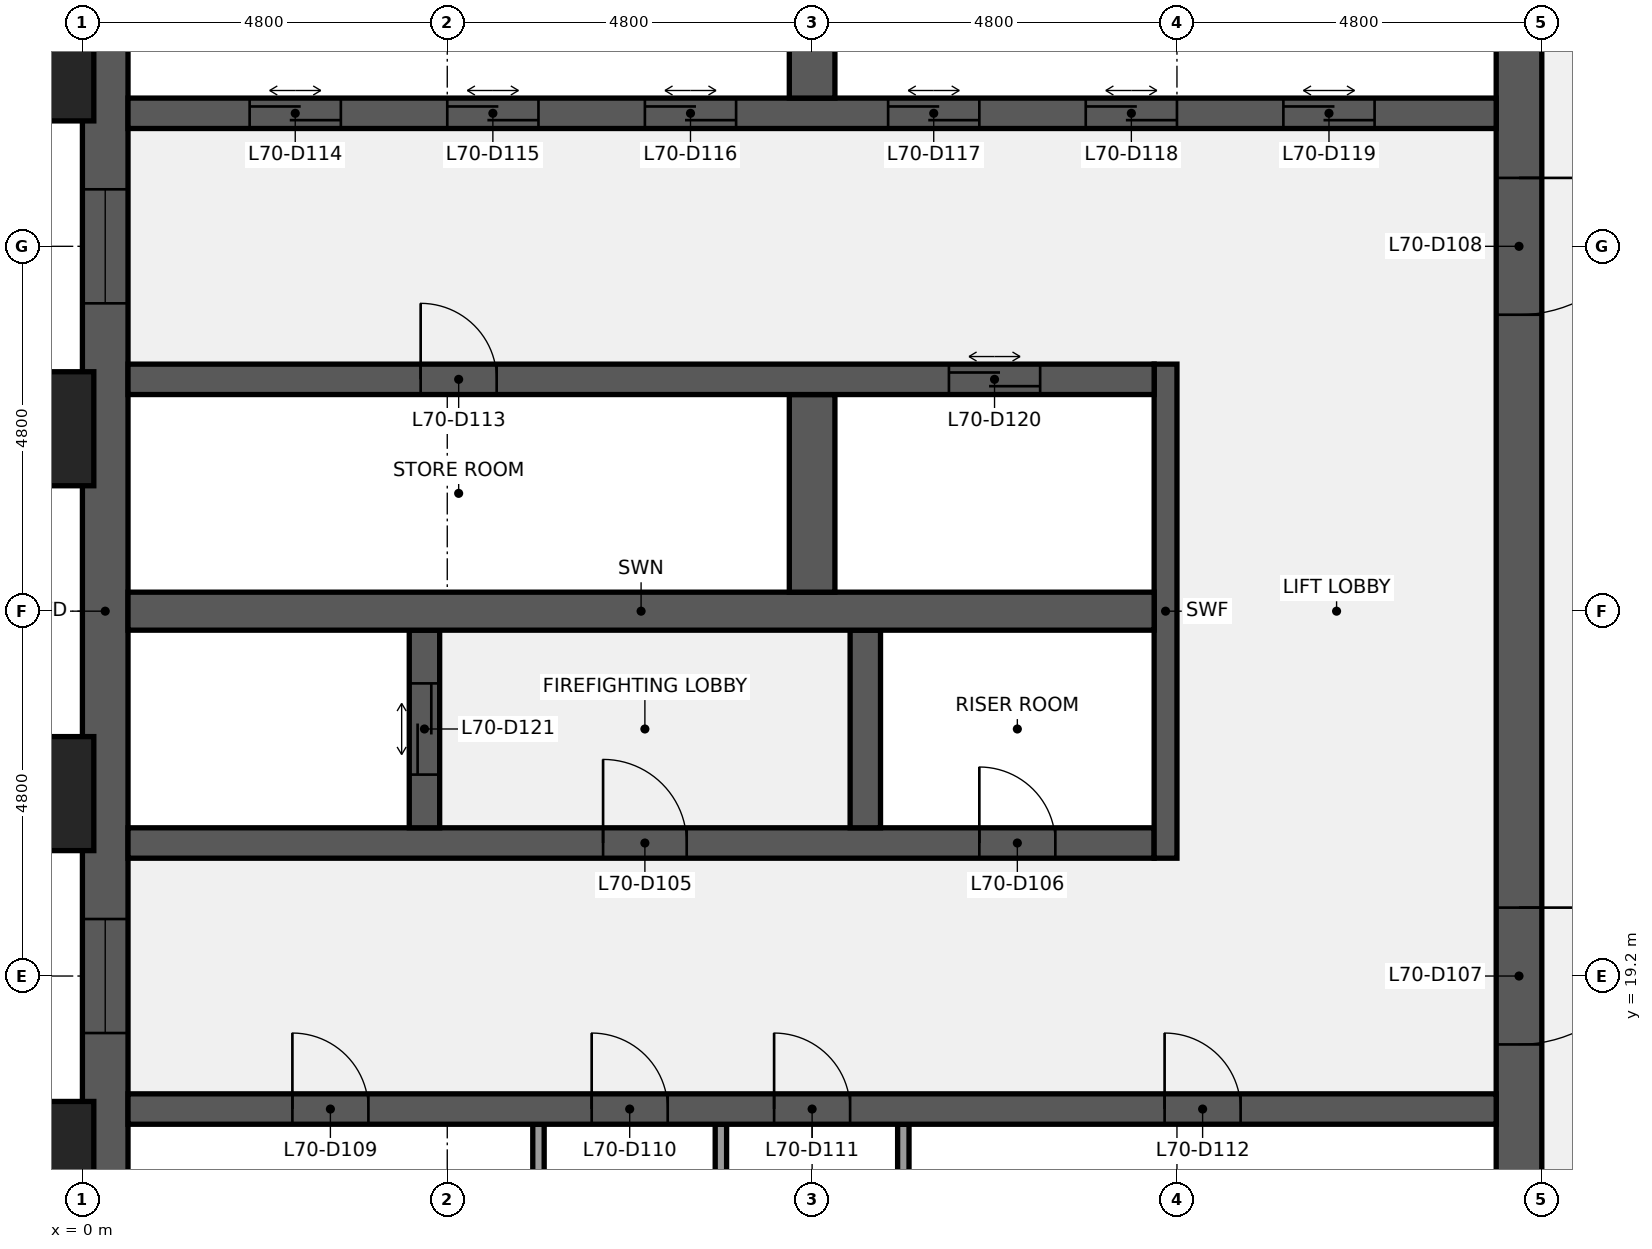
"""IFC4 building model, lengths in metres.
Left out: names, types, materials, properties, quantities, classifications, styles, units other than length and angle.
Written with IfcOpenShell. Run it as: python <this file> out.ifc"""

import sys

from ifc_helpers import new_model, si_unit, direction, frame, frame_2d, origin, origin_2d, place, context, subcontext, project, spatial, rectangle, extrude, element, fill, save


model = new_model("IFC4")
c1 = context("Model", 3, precision=1e-05, world=origin(), true_north=direction((0.0, 1.0)))
c2 = subcontext(c1, "Body", "Model", "MODEL_VIEW")
j1 = project(units=[si_unit("LENGTHUNIT", "METRE"), si_unit("PLANEANGLEUNIT", "RADIAN")], contexts=[c1])
p1 = place(None, origin())
s1 = spatial("IfcSite", under=j1, at=p1, CompositionType="ELEMENT")
p2 = place(p1, origin())
s2 = spatial("IfcBuilding", under=s1, at=p2, CompositionType="ELEMENT")
p3 = place(p2, frame((0.0, 0.0, 318.3)))
s3 = spatial("IfcBuildingStorey", under=s2, at=p3, CompositionType="ELEMENT", Elevation=318.3)
p4 = place(p3, frame((0.3, 9.6, 0.0), z_axis=(0.0, 0.0, 1.0), x_axis=(0.0, 1.0, 0.0)))
e1 = element("IfcWall", 1, at=p4, inside=s3, PredefinedType="SHEAR", context=c2, shape_type="SweptSolid", body=[
    extrude(rectangle(XDim=28.8, YDim=0.6, at=frame_2d((14.4, 0.0))), origin(), (0.0, 0.0, 1.0), 3.84),
])
p5 = place(p4, frame((8.85, 0.0, 0.9)))
e2 = element("IfcOpeningElement", 2, at=p5, cuts=e1, PredefinedType="OPENING", context=c2, shape_type="SweptSolid", body=[
    extrude(rectangle(XDim=1.5, YDim=1.5, at=frame_2d((0.75, 0.75))), frame((0.0, 0.31, 0.0), z_axis=(0.0, -1.0, 0.0), x_axis=(1.0, 0.0, 0.0)), (0.0, 0.0, 1.0), 0.62),
])
p6 = place(p4, frame((18.45, 0.0, 0.9)))
e3 = element("IfcOpeningElement", 3, at=p6, cuts=e1, PredefinedType="OPENING", context=c2, shape_type="SweptSolid", body=[
    extrude(rectangle(XDim=1.5, YDim=1.5, at=frame_2d((0.75, 0.75))), frame((0.0, 0.31, 0.0), z_axis=(0.0, -1.0, 0.0), x_axis=(1.0, 0.0, 0.0)), (0.0, 0.0, 1.0), 0.62),
])
p7 = place(p3, frame((18.9, 38.4, 0.0), z_axis=(0.0, 0.0, 1.0), x_axis=(0.0, -1.0, 0.0)))
e4 = element("IfcWall", 4, at=p7, inside=s3, PredefinedType="SHEAR", context=c2, shape_type="SweptSolid", body=[
    extrude(rectangle(XDim=28.8, YDim=0.6, at=frame_2d((14.4, 0.0))), origin(), (0.0, 0.0, 1.0), 3.84),
])
p8 = place(p7, frame((18.3, 0.0, 0.0)))
e5 = element("IfcOpeningElement", 5, at=p8, cuts=e4, PredefinedType="OPENING", context=c2, shape_type="SweptSolid", body=[
    extrude(rectangle(XDim=1.8, YDim=2.1, at=frame_2d((0.9, 1.05))), frame((0.0, 0.31, 0.0), z_axis=(0.0, -1.0, 0.0), x_axis=(1.0, 0.0, 0.0)), (0.0, 0.0, 1.0), 0.62),
])
p9 = place(p7, frame((8.7, 0.0, 0.0)))
e6 = element("IfcOpeningElement", 6, at=p9, cuts=e4, PredefinedType="OPENING", context=c2, shape_type="SweptSolid", body=[
    extrude(rectangle(XDim=1.8, YDim=2.1, at=frame_2d((0.9, 1.05))), frame((0.0, 0.31, 0.0), z_axis=(0.0, -1.0, 0.0), x_axis=(1.0, 0.0, 0.0)), (0.0, 0.0, 1.0), 0.62),
])
for number, where, z_axis, x_axis in (
    (7, (6.0, 14.65, 0.0), (0.0, 0.0, 1.0), (0.0, 1.0, 0.0)),
    (8, (8.4, 14.65, 0.0), (0.0, 0.0, 1.0), (0.0, 1.0, 0.0)),
    (9, (10.8, 14.65, 0.0), (0.0, 0.0, 1.0), (0.0, 1.0, 0.0)),
):
    element("IfcWall", number, at=place(p3, frame(where, z_axis=z_axis, x_axis=x_axis)), inside=s3, PredefinedType="PARTITIONING", context=c2, shape_type="SweptSolid", body=[
        extrude(rectangle(XDim=2.6, YDim=0.15, at=frame_2d((1.3, 0.0))), origin(), (0.0, 0.0, 1.0), 3.84),
    ])
p10 = place(p3, frame((0.6, 17.45, 0.0), z_axis=(0.0, 0.0, 1.0), x_axis=(1.0, 0.0, 0.0)))
e10 = element("IfcWall", 10, at=p10, inside=s3, PredefinedType="SHEAR", context=c2, shape_type="SweptSolid", body=[
    extrude(rectangle(XDim=18.0, YDim=0.4, at=frame_2d((9.0, 0.0))), origin(), (0.0, 0.0, 1.0), 3.84),
])
p11 = place(p10, frame((2.163, 0.0, 0.0)))
e11 = element("IfcOpeningElement", 11, at=p11, cuts=e10, PredefinedType="OPENING", context=c2, shape_type="SweptSolid", body=[
    extrude(rectangle(XDim=1.0, YDim=2.1, at=frame_2d((0.5, 1.05))), frame((0.0, 0.21, 0.0), z_axis=(0.0, -1.0, 0.0), x_axis=(1.0, 0.0, 0.0)), (0.0, 0.0, 1.0), 0.42),
])
p12 = place(p10, frame((6.1, 0.0, 0.0)))
e12 = element("IfcOpeningElement", 12, at=p12, cuts=e10, PredefinedType="OPENING", context=c2, shape_type="SweptSolid", body=[
    extrude(rectangle(XDim=1.0, YDim=2.1, at=frame_2d((0.5, 1.05))), frame((0.0, 0.21, 0.0), z_axis=(0.0, -1.0, 0.0), x_axis=(1.0, 0.0, 0.0)), (0.0, 0.0, 1.0), 0.42),
])
p13 = place(p10, frame((8.5, 0.0, 0.0)))
e13 = element("IfcOpeningElement", 13, at=p13, cuts=e10, PredefinedType="OPENING", context=c2, shape_type="SweptSolid", body=[
    extrude(rectangle(XDim=1.0, YDim=2.1, at=frame_2d((0.5, 1.05))), frame((0.0, 0.21, 0.0), z_axis=(0.0, -1.0, 0.0), x_axis=(1.0, 0.0, 0.0)), (0.0, 0.0, 1.0), 0.42),
])
p14 = place(p10, frame((13.637, 0.0, 0.0)))
e14 = element("IfcOpeningElement", 14, at=p14, cuts=e10, PredefinedType="OPENING", context=c2, shape_type="SweptSolid", body=[
    extrude(rectangle(XDim=1.0, YDim=2.1, at=frame_2d((0.5, 1.05))), frame((0.0, 0.21, 0.0), z_axis=(0.0, -1.0, 0.0), x_axis=(1.0, 0.0, 0.0)), (0.0, 0.0, 1.0), 0.42),
])
p15 = place(p3, frame((0.6, 20.95, 0.0), z_axis=(0.0, 0.0, 1.0), x_axis=(1.0, 0.0, 0.0)))
e15 = element("IfcWall", 15, at=p15, inside=s3, PredefinedType="SHEAR", context=c2, shape_type="SweptSolid", body=[
    extrude(rectangle(XDim=13.5, YDim=0.4, at=frame_2d((6.75, 0.0))), origin(), (0.0, 0.0, 1.0), 3.84),
])
p16 = place(p15, frame((6.25, 0.0, 0.0)))
e16 = element("IfcOpeningElement", 16, at=p16, cuts=e15, PredefinedType="OPENING", context=c2, shape_type="SweptSolid", body=[
    extrude(rectangle(XDim=1.1, YDim=2.1, at=frame_2d((0.55, 1.05))), frame((0.0, 0.21, 0.0), z_axis=(0.0, -1.0, 0.0), x_axis=(1.0, 0.0, 0.0)), (0.0, 0.0, 1.0), 0.42),
])
p17 = place(p15, frame((11.2, 0.0, 0.0)))
e17 = element("IfcOpeningElement", 17, at=p17, cuts=e15, PredefinedType="OPENING", context=c2, shape_type="SweptSolid", body=[
    extrude(rectangle(XDim=1.0, YDim=2.1, at=frame_2d((0.5, 1.05))), frame((0.0, 0.21, 0.0), z_axis=(0.0, -1.0, 0.0), x_axis=(1.0, 0.0, 0.0)), (0.0, 0.0, 1.0), 0.42),
])
p18 = place(p3, frame((14.25, 20.75, 0.0), z_axis=(0.0, 0.0, 1.0), x_axis=(0.0, 1.0, 0.0)))
e18 = element("IfcWall", 18, at=p18, inside=s3, PredefinedType="SHEAR", context=c2, shape_type="SweptSolid", body=[
    extrude(rectangle(XDim=6.5, YDim=0.3, at=frame_2d((3.25, 0.0))), origin(), (0.0, 0.0, 1.0), 3.84),
])
p19 = place(p3, frame((4.5, 21.15, 0.0), z_axis=(0.0, 0.0, 1.0), x_axis=(0.0, 1.0, 0.0)))
e19 = element("IfcWall", 19, at=p19, inside=s3, PredefinedType="SHEAR", context=c2, shape_type="SweptSolid", body=[
    extrude(rectangle(XDim=2.6, YDim=0.4, at=frame_2d((1.3, 0.0))), origin(), (0.0, 0.0, 1.0), 3.84),
])
p20 = place(p19, frame((0.7, 0.0, 0.0)))
e20 = element("IfcOpeningElement", 20, at=p20, cuts=e19, PredefinedType="OPENING", context=c2, shape_type="SweptSolid", body=[
    extrude(rectangle(XDim=1.2, YDim=2.1, at=frame_2d((0.6, 1.05))), frame((0.0, 0.21, 0.0), z_axis=(0.0, -1.0, 0.0), x_axis=(1.0, 0.0, 0.0)), (0.0, 0.0, 1.0), 0.42),
])
p21 = place(p3, frame((10.3, 21.15, 0.0), z_axis=(0.0, 0.0, 1.0), x_axis=(0.0, 1.0, 0.0)))
e21 = element("IfcWall", 21, at=p21, inside=s3, PredefinedType="SHEAR", context=c2, shape_type="SweptSolid", body=[
    extrude(rectangle(XDim=2.6, YDim=0.4, at=frame_2d((1.3, 0.0))), origin(), (0.0, 0.0, 1.0), 3.84),
])
p22 = place(p3, frame((0.6, 24.0, 0.0), z_axis=(0.0, 0.0, 1.0), x_axis=(1.0, 0.0, 0.0)))
e22 = element("IfcWall", 22, at=p22, inside=s3, PredefinedType="SHEAR", context=c2, shape_type="SweptSolid", body=[
    extrude(rectangle(XDim=13.5, YDim=0.5, at=frame_2d((6.75, 0.0))), origin(), (0.0, 0.0, 1.0), 3.84),
])
p23 = place(p3, frame((9.6, 24.25, 0.0), z_axis=(0.0, 0.0, 1.0), x_axis=(0.0, 1.0, 0.0)))
e23 = element("IfcWall", 23, at=p23, inside=s3, PredefinedType="SHEAR", context=c2, shape_type="SweptSolid", body=[
    extrude(rectangle(XDim=2.6, YDim=0.6, at=frame_2d((1.3, 0.0))), origin(), (0.0, 0.0, 1.0), 3.84),
])
p24 = place(p3, frame((0.6, 27.05, 0.0), z_axis=(0.0, 0.0, 1.0), x_axis=(1.0, 0.0, 0.0)))
e24 = element("IfcWall", 24, at=p24, inside=s3, PredefinedType="SHEAR", context=c2, shape_type="SweptSolid", body=[
    extrude(rectangle(XDim=13.5, YDim=0.4, at=frame_2d((6.75, 0.0))), origin(), (0.0, 0.0, 1.0), 3.84),
])
p25 = place(p24, frame((3.85, 0.0, 0.0)))
e25 = element("IfcOpeningElement", 25, at=p25, cuts=e24, PredefinedType="OPENING", context=c2, shape_type="SweptSolid", body=[
    extrude(rectangle(XDim=1.0, YDim=2.1, at=frame_2d((0.5, 1.05))), frame((0.0, 0.21, 0.0), z_axis=(0.0, -1.0, 0.0), x_axis=(1.0, 0.0, 0.0)), (0.0, 0.0, 1.0), 0.42),
])
p26 = place(p24, frame((10.8, 0.0, 0.0)))
e26 = element("IfcOpeningElement", 26, at=p26, cuts=e24, PredefinedType="OPENING", context=c2, shape_type="SweptSolid", body=[
    extrude(rectangle(XDim=1.2, YDim=2.1, at=frame_2d((0.6, 1.05))), frame((0.0, 0.21, 0.0), z_axis=(0.0, -1.0, 0.0), x_axis=(1.0, 0.0, 0.0)), (0.0, 0.0, 1.0), 0.42),
])
p27 = place(p3, frame((0.6, 30.55, 0.0), z_axis=(0.0, 0.0, 1.0), x_axis=(1.0, 0.0, 0.0)))
e27 = element("IfcWall", 27, at=p27, inside=s3, PredefinedType="SHEAR", context=c2, shape_type="SweptSolid", body=[
    extrude(rectangle(XDim=18.0, YDim=0.4, at=frame_2d((9.0, 0.0))), origin(), (0.0, 0.0, 1.0), 3.84),
])
p28 = place(p27, frame((1.6, 0.0, 0.0)))
e28 = element("IfcOpeningElement", 28, at=p28, cuts=e27, PredefinedType="OPENING", context=c2, shape_type="SweptSolid", body=[
    extrude(rectangle(XDim=1.2, YDim=2.1, at=frame_2d((0.6, 1.05))), frame((0.0, 0.21, 0.0), z_axis=(0.0, -1.0, 0.0), x_axis=(1.0, 0.0, 0.0)), (0.0, 0.0, 1.0), 0.42),
])
p29 = place(p27, frame((4.2, 0.0, 0.0)))
e29 = element("IfcOpeningElement", 29, at=p29, cuts=e27, PredefinedType="OPENING", context=c2, shape_type="SweptSolid", body=[
    extrude(rectangle(XDim=1.2, YDim=2.1, at=frame_2d((0.6, 1.05))), frame((0.0, 0.21, 0.0), z_axis=(0.0, -1.0, 0.0), x_axis=(1.0, 0.0, 0.0)), (0.0, 0.0, 1.0), 0.42),
])
p30 = place(p27, frame((6.8, 0.0, 0.0)))
e30 = element("IfcOpeningElement", 30, at=p30, cuts=e27, PredefinedType="OPENING", context=c2, shape_type="SweptSolid", body=[
    extrude(rectangle(XDim=1.2, YDim=2.1, at=frame_2d((0.6, 1.05))), frame((0.0, 0.21, 0.0), z_axis=(0.0, -1.0, 0.0), x_axis=(1.0, 0.0, 0.0)), (0.0, 0.0, 1.0), 0.42),
])
p31 = place(p27, frame((10.0, 0.0, 0.0)))
e31 = element("IfcOpeningElement", 31, at=p31, cuts=e27, PredefinedType="OPENING", context=c2, shape_type="SweptSolid", body=[
    extrude(rectangle(XDim=1.2, YDim=2.1, at=frame_2d((0.6, 1.05))), frame((0.0, 0.21, 0.0), z_axis=(0.0, -1.0, 0.0), x_axis=(1.0, 0.0, 0.0)), (0.0, 0.0, 1.0), 0.42),
])
p32 = place(p27, frame((12.6, 0.0, 0.0)))
e32 = element("IfcOpeningElement", 32, at=p32, cuts=e27, PredefinedType="OPENING", context=c2, shape_type="SweptSolid", body=[
    extrude(rectangle(XDim=1.2, YDim=2.1, at=frame_2d((0.6, 1.05))), frame((0.0, 0.21, 0.0), z_axis=(0.0, -1.0, 0.0), x_axis=(1.0, 0.0, 0.0)), (0.0, 0.0, 1.0), 0.42),
])
p33 = place(p27, frame((15.2, 0.0, 0.0)))
e33 = element("IfcOpeningElement", 33, at=p33, cuts=e27, PredefinedType="OPENING", context=c2, shape_type="SweptSolid", body=[
    extrude(rectangle(XDim=1.2, YDim=2.1, at=frame_2d((0.6, 1.05))), frame((0.0, 0.21, 0.0), z_axis=(0.0, -1.0, 0.0), x_axis=(1.0, 0.0, 0.0)), (0.0, 0.0, 1.0), 0.42),
])
p34 = place(p3, frame((9.6, 30.75, 0.0), z_axis=(0.0, 0.0, 1.0), x_axis=(0.0, 1.0, 0.0)))
e34 = element("IfcWall", 34, at=p34, inside=s3, PredefinedType="SHEAR", context=c2, shape_type="SweptSolid", body=[
    extrude(rectangle(XDim=2.6, YDim=0.6, at=frame_2d((1.3, 0.0))), origin(), (0.0, 0.0, 1.0), 3.84),
])
for number, where, z_axis, x_axis in (
    (35, (-0.75, 16.8, 0.0), (0.0, 0.0, 1.0), (0.0, 1.0, 0.0)),
    (36, (-0.75, 21.6, 0.0), (0.0, 0.0, 1.0), (0.0, 1.0, 0.0)),
    (37, (-0.75, 26.4, 0.0), (0.0, 0.0, 1.0), (0.0, 1.0, 0.0)),
    (38, (-0.75, 31.2, 0.0), (0.0, 0.0, 1.0), (0.0, 1.0, 0.0)),
):
    element("IfcColumn", number, at=place(p3, frame(where, z_axis=z_axis, x_axis=x_axis)), inside=s3, PredefinedType="PILASTER", context=c2, shape_type="SweptSolid", body=[
        extrude(rectangle(XDim=1.8, YDim=1.5, at=origin_2d()), origin(), (0.0, 0.0, 1.0), 4.0),
    ])
p35 = place(p16, origin())
e39 = element("IfcDoor", 39, at=p35, inside=s3, OperationType="SINGLE_SWING_LEFT", PredefinedType="DOOR", context=c2, shape_type="SweptSolid", body=[
    extrude(rectangle(XDim=1.1, YDim=2.1, at=frame_2d((0.55, 1.05))), frame((0.0, 0.025, 0.0), z_axis=(0.0, -1.0, 0.0), x_axis=(1.0, 0.0, 0.0)), (0.0, 0.0, 1.0), 0.05),
])
fill(e16, e39)
p36 = place(p17, origin())
e40 = element("IfcDoor", 40, at=p36, inside=s3, OperationType="SINGLE_SWING_LEFT", PredefinedType="DOOR", context=c2, shape_type="SweptSolid", body=[
    extrude(rectangle(XDim=1.0, YDim=2.1, at=frame_2d((0.5, 1.05))), frame((0.0, 0.025, 0.0), z_axis=(0.0, -1.0, 0.0), x_axis=(1.0, 0.0, 0.0)), (0.0, 0.0, 1.0), 0.05),
])
fill(e17, e40)
p37 = place(p8, origin())
e41 = element("IfcDoor", 41, at=p37, inside=s3, OperationType="DOUBLE_DOOR_SINGLE_SWING", PredefinedType="DOOR", context=c2, shape_type="SweptSolid", body=[
    extrude(rectangle(XDim=1.8, YDim=2.1, at=frame_2d((0.9, 1.05))), frame((0.0, 0.025, 0.0), z_axis=(0.0, -1.0, 0.0), x_axis=(1.0, 0.0, 0.0)), (0.0, 0.0, 1.0), 0.05),
])
fill(e5, e41)
p38 = place(p9, origin())
e42 = element("IfcDoor", 42, at=p38, inside=s3, OperationType="DOUBLE_DOOR_SINGLE_SWING", PredefinedType="DOOR", context=c2, shape_type="SweptSolid", body=[
    extrude(rectangle(XDim=1.8, YDim=2.1, at=frame_2d((0.9, 1.05))), frame((0.0, 0.025, 0.0), z_axis=(0.0, -1.0, 0.0), x_axis=(1.0, 0.0, 0.0)), (0.0, 0.0, 1.0), 0.05),
])
fill(e6, e42)
p39 = place(p11, origin())
e43 = element("IfcDoor", 43, at=p39, inside=s3, OperationType="SINGLE_SWING_LEFT", PredefinedType="DOOR", context=c2, shape_type="SweptSolid", body=[
    extrude(rectangle(XDim=1.0, YDim=2.1, at=frame_2d((0.5, 1.05))), frame((0.0, 0.025, 0.0), z_axis=(0.0, -1.0, 0.0), x_axis=(1.0, 0.0, 0.0)), (0.0, 0.0, 1.0), 0.05),
])
fill(e11, e43)
p40 = place(p12, origin())
e44 = element("IfcDoor", 44, at=p40, inside=s3, OperationType="SINGLE_SWING_LEFT", PredefinedType="DOOR", context=c2, shape_type="SweptSolid", body=[
    extrude(rectangle(XDim=1.0, YDim=2.1, at=frame_2d((0.5, 1.05))), frame((0.0, 0.025, 0.0), z_axis=(0.0, -1.0, 0.0), x_axis=(1.0, 0.0, 0.0)), (0.0, 0.0, 1.0), 0.05),
])
fill(e12, e44)
p41 = place(p13, origin())
e45 = element("IfcDoor", 45, at=p41, inside=s3, OperationType="SINGLE_SWING_LEFT", PredefinedType="DOOR", context=c2, shape_type="SweptSolid", body=[
    extrude(rectangle(XDim=1.0, YDim=2.1, at=frame_2d((0.5, 1.05))), frame((0.0, 0.025, 0.0), z_axis=(0.0, -1.0, 0.0), x_axis=(1.0, 0.0, 0.0)), (0.0, 0.0, 1.0), 0.05),
])
fill(e13, e45)
p42 = place(p14, origin())
e46 = element("IfcDoor", 46, at=p42, inside=s3, OperationType="SINGLE_SWING_LEFT", PredefinedType="DOOR", context=c2, shape_type="SweptSolid", body=[
    extrude(rectangle(XDim=1.0, YDim=2.1, at=frame_2d((0.5, 1.05))), frame((0.0, 0.025, 0.0), z_axis=(0.0, -1.0, 0.0), x_axis=(1.0, 0.0, 0.0)), (0.0, 0.0, 1.0), 0.05),
])
fill(e14, e46)
p43 = place(p25, origin())
e47 = element("IfcDoor", 47, at=p43, inside=s3, OperationType="SINGLE_SWING_LEFT", PredefinedType="DOOR", context=c2, shape_type="SweptSolid", body=[
    extrude(rectangle(XDim=1.0, YDim=2.1, at=frame_2d((0.5, 1.05))), frame((0.0, 0.025, 0.0), z_axis=(0.0, -1.0, 0.0), x_axis=(1.0, 0.0, 0.0)), (0.0, 0.0, 1.0), 0.05),
])
fill(e25, e47)
p44 = place(p28, origin())
e48 = element("IfcDoor", 48, at=p44, inside=s3, OperationType="DOUBLE_DOOR_SLIDING", PredefinedType="DOOR", context=c2, shape_type="SweptSolid", body=[
    extrude(rectangle(XDim=1.2, YDim=2.1, at=frame_2d((0.6, 1.05))), frame((0.0, 0.025, 0.0), z_axis=(0.0, -1.0, 0.0), x_axis=(1.0, 0.0, 0.0)), (0.0, 0.0, 1.0), 0.05),
])
fill(e28, e48)
p45 = place(p29, origin())
e49 = element("IfcDoor", 49, at=p45, inside=s3, OperationType="DOUBLE_DOOR_SLIDING", PredefinedType="DOOR", context=c2, shape_type="SweptSolid", body=[
    extrude(rectangle(XDim=1.2, YDim=2.1, at=frame_2d((0.6, 1.05))), frame((0.0, 0.025, 0.0), z_axis=(0.0, -1.0, 0.0), x_axis=(1.0, 0.0, 0.0)), (0.0, 0.0, 1.0), 0.05),
])
fill(e29, e49)
p46 = place(p30, origin())
e50 = element("IfcDoor", 50, at=p46, inside=s3, OperationType="DOUBLE_DOOR_SLIDING", PredefinedType="DOOR", context=c2, shape_type="SweptSolid", body=[
    extrude(rectangle(XDim=1.2, YDim=2.1, at=frame_2d((0.6, 1.05))), frame((0.0, 0.025, 0.0), z_axis=(0.0, -1.0, 0.0), x_axis=(1.0, 0.0, 0.0)), (0.0, 0.0, 1.0), 0.05),
])
fill(e30, e50)
p47 = place(p31, origin())
e51 = element("IfcDoor", 51, at=p47, inside=s3, OperationType="DOUBLE_DOOR_SLIDING", PredefinedType="DOOR", context=c2, shape_type="SweptSolid", body=[
    extrude(rectangle(XDim=1.2, YDim=2.1, at=frame_2d((0.6, 1.05))), frame((0.0, 0.025, 0.0), z_axis=(0.0, -1.0, 0.0), x_axis=(1.0, 0.0, 0.0)), (0.0, 0.0, 1.0), 0.05),
])
fill(e31, e51)
p48 = place(p32, origin())
e52 = element("IfcDoor", 52, at=p48, inside=s3, OperationType="DOUBLE_DOOR_SLIDING", PredefinedType="DOOR", context=c2, shape_type="SweptSolid", body=[
    extrude(rectangle(XDim=1.2, YDim=2.1, at=frame_2d((0.6, 1.05))), frame((0.0, 0.025, 0.0), z_axis=(0.0, -1.0, 0.0), x_axis=(1.0, 0.0, 0.0)), (0.0, 0.0, 1.0), 0.05),
])
fill(e32, e52)
p49 = place(p33, origin())
e53 = element("IfcDoor", 53, at=p49, inside=s3, OperationType="DOUBLE_DOOR_SLIDING", PredefinedType="DOOR", context=c2, shape_type="SweptSolid", body=[
    extrude(rectangle(XDim=1.2, YDim=2.1, at=frame_2d((0.6, 1.05))), frame((0.0, 0.025, 0.0), z_axis=(0.0, -1.0, 0.0), x_axis=(1.0, 0.0, 0.0)), (0.0, 0.0, 1.0), 0.05),
])
fill(e33, e53)
p50 = place(p26, origin())
e54 = element("IfcDoor", 54, at=p50, inside=s3, OperationType="DOUBLE_DOOR_SLIDING", PredefinedType="DOOR", context=c2, shape_type="SweptSolid", body=[
    extrude(rectangle(XDim=1.2, YDim=2.1, at=frame_2d((0.6, 1.05))), frame((0.0, 0.025, 0.0), z_axis=(0.0, -1.0, 0.0), x_axis=(1.0, 0.0, 0.0)), (0.0, 0.0, 1.0), 0.05),
])
fill(e26, e54)
p51 = place(p20, origin())
e55 = element("IfcDoor", 55, at=p51, inside=s3, OperationType="DOUBLE_DOOR_SLIDING", PredefinedType="DOOR", context=c2, shape_type="SweptSolid", body=[
    extrude(rectangle(XDim=1.2, YDim=2.1, at=frame_2d((0.6, 1.05))), frame((0.0, 0.025, 0.0), z_axis=(0.0, -1.0, 0.0), x_axis=(1.0, 0.0, 0.0)), (0.0, 0.0, 1.0), 0.05),
])
fill(e20, e55)
p52 = place(p5, origin())
e56 = element("IfcWindow", 56, at=p52, inside=s3, PartitioningType="SINGLE_PANEL", PredefinedType="WINDOW", context=c2, shape_type="SweptSolid", body=[
    extrude(rectangle(XDim=1.5, YDim=1.5, at=frame_2d((0.75, 0.75))), frame((0.0, 0.03, 0.0), z_axis=(0.0, -1.0, 0.0), x_axis=(1.0, 0.0, 0.0)), (0.0, 0.0, 1.0), 0.06),
])
fill(e2, e56)
p53 = place(p6, origin())
e57 = element("IfcWindow", 57, at=p53, inside=s3, PartitioningType="SINGLE_PANEL", PredefinedType="WINDOW", context=c2, shape_type="SweptSolid", body=[
    extrude(rectangle(XDim=1.5, YDim=1.5, at=frame_2d((0.75, 0.75))), frame((0.0, 0.03, 0.0), z_axis=(0.0, -1.0, 0.0), x_axis=(1.0, 0.0, 0.0)), (0.0, 0.0, 1.0), 0.06),
])
fill(e3, e57)
save(model, sys.argv[1])
